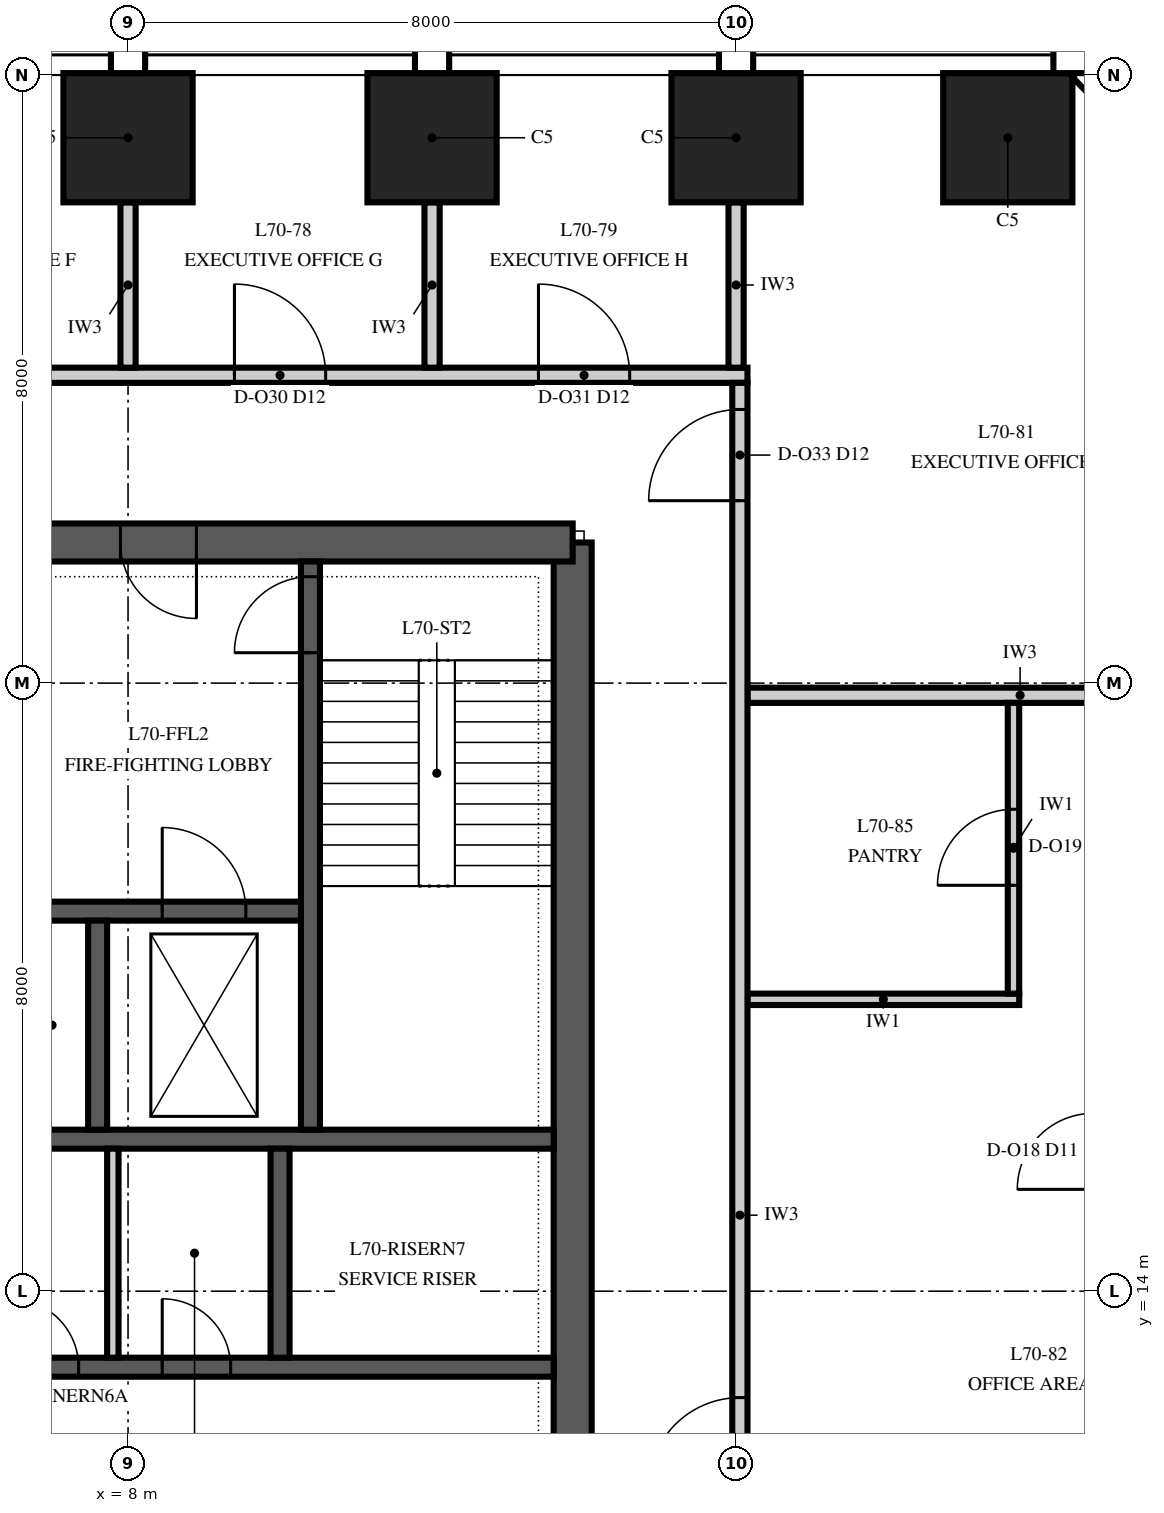
"""IFC4 building model, lengths in metres.
Left out: names, types, materials, properties, quantities, classifications, styles, units other than length and angle.
Written with IfcOpenShell. Run it as: python <this file> out.ifc"""

import sys

from ifc_helpers import new_model, si_unit, direction, frame, frame_2d, origin, origin_2d, place, context, subcontext, project, spatial, polyline, rectangle, outline, extrude, element, fill, save


model = new_model("IFC4")
c1 = context("Model", 3, precision=1e-05, world=origin(), true_north=direction((0.0, 1.0)))
c2 = subcontext(c1, "Body", "Model", "MODEL_VIEW")
j1 = project(units=[si_unit("LENGTHUNIT", "METRE"), si_unit("PLANEANGLEUNIT", "RADIAN")], contexts=[c1])
p1 = place(None, origin())
s1 = spatial("IfcSite", under=j1, at=p1, CompositionType="ELEMENT")
p2 = place(p1, origin())
s2 = spatial("IfcBuilding", under=s1, at=p2, CompositionType="ELEMENT")
p3 = place(p2, frame((0.0, 0.0, 300.0)))
s3 = spatial("IfcBuildingStorey", under=s2, at=p3, CompositionType="ELEMENT", Elevation=300.0)
for number, where, z_axis, x_axis in (
    (1, (19.575, 29.175, 0.0), (0.0, 0.0, 1.0), (-1.0, 0.0, 0.0)),
    (2, (16.0, 29.175, 0.0), (0.0, 0.0, 1.0), (-1.0, 0.0, 0.0)),
    (3, (12.0, 29.175, 0.0), (0.0, 0.0, 1.0), (-1.0, 0.0, 0.0)),
    (4, (8.0, 29.175, 0.0), (0.0, 0.0, 1.0), (-1.0, 0.0, 0.0)),
):
    element("IfcColumn", number, at=place(p3, frame(where, z_axis=z_axis, x_axis=x_axis)), inside=s3, PredefinedType="COLUMN", context=c2, shape_type="SweptSolid", body=[
        extrude(rectangle(XDim=1.7, YDim=1.7, at=origin_2d()), origin(), (0.0, 0.0, 1.0), 4.0),
    ])
p4 = place(p3, frame((13.85, 6.15, 0.0), z_axis=(0.0, 0.0, 1.0), x_axis=(0.0, 1.0, 0.0)))
e5 = element("IfcWall", 5, at=p4, inside=s3, PredefinedType="SHEAR", context=c2, shape_type="SweptSolid", body=[
    extrude(outline(polyline([(0.0, -0.25), (17.7, -0.25), (17.7, 0.0), (17.45, 0.0), (17.45, 0.25), (0.25, 0.25), (0.25, 0.0), (0.0, 0.0), (0.0, -0.25)])), origin(), (0.0, 0.0, 1.0), 4.0),
])
p5 = place(p4, frame((4.15, 0.0, 0.0)))
e6 = element("IfcOpeningElement", 6, at=p5, cuts=e5, PredefinedType="OPENING", context=c2, shape_type="SweptSolid", body=[
    extrude(rectangle(XDim=1.8, YDim=2.4, at=frame_2d((0.9, 1.2))), frame((0.0, 0.265, 0.0), z_axis=(0.0, -1.0, 0.0), x_axis=(1.0, 0.0, 0.0)), (0.0, 0.0, 1.0), 0.53),
])
p6 = place(p3, frame((13.85, 23.85, 0.0), z_axis=(0.0, 0.0, 1.0), x_axis=(-1.0, 0.0, 0.0)))
e7 = element("IfcWall", 7, at=p6, inside=s3, PredefinedType="SHEAR", context=c2, shape_type="SweptSolid", body=[
    extrude(rectangle(XDim=27.7, YDim=0.5, at=frame_2d((13.85, 0.0))), origin(), (0.0, 0.0, 1.0), 4.0),
])
p7 = place(p6, frame((21.75, 0.0, 0.0)))
e8 = element("IfcOpeningElement", 8, at=p7, cuts=e7, PredefinedType="OPENING", context=c2, shape_type="SweptSolid", body=[
    extrude(rectangle(XDim=1.0, YDim=2.1, at=frame_2d((0.5, 1.05))), frame((0.0, 0.265, 0.0), z_axis=(0.0, -1.0, 0.0), x_axis=(1.0, 0.0, 0.0)), (0.0, 0.0, 1.0), 0.53),
])
p8 = place(p6, frame((4.95, 0.0, 0.0)))
e9 = element("IfcOpeningElement", 9, at=p8, cuts=e7, PredefinedType="OPENING", context=c2, shape_type="SweptSolid", body=[
    extrude(rectangle(XDim=1.0, YDim=2.1, at=frame_2d((0.5, 1.05))), frame((0.0, 0.265, 0.0), z_axis=(0.0, -1.0, 0.0), x_axis=(1.0, 0.0, 0.0)), (0.0, 0.0, 1.0), 0.53),
])
p9 = place(p6, frame((17.35, 0.0, 0.0)))
e10 = element("IfcOpeningElement", 10, at=p9, cuts=e7, PredefinedType="OPENING", context=c2, shape_type="SweptSolid", body=[
    extrude(rectangle(XDim=1.0, YDim=2.1, at=frame_2d((0.5, 1.05))), frame((0.0, 0.265, 0.0), z_axis=(0.0, -1.0, 0.0), x_axis=(1.0, 0.0, 0.0)), (0.0, 0.0, 1.0), 0.53),
])
p10 = place(p6, frame((13.35, 0.0, 0.0)))
e11 = element("IfcOpeningElement", 11, at=p10, cuts=e7, PredefinedType="OPENING", context=c2, shape_type="SweptSolid", body=[
    extrude(rectangle(XDim=1.0, YDim=2.1, at=frame_2d((0.5, 1.05))), frame((0.0, 0.265, 0.0), z_axis=(0.0, -1.0, 0.0), x_axis=(1.0, 0.0, 0.0)), (0.0, 0.0, 1.0), 0.53),
])
p11 = place(p6, frame((9.35, 0.0, 0.0)))
e12 = element("IfcOpeningElement", 12, at=p11, cuts=e7, PredefinedType="OPENING", context=c2, shape_type="SweptSolid", body=[
    extrude(rectangle(XDim=1.0, YDim=2.1, at=frame_2d((0.5, 1.05))), frame((0.0, 0.265, 0.0), z_axis=(0.0, -1.0, 0.0), x_axis=(1.0, 0.0, 0.0)), (0.0, 0.0, 1.0), 0.53),
])
p12 = place(p3, frame((-13.6, 13.0, 0.0), z_axis=(0.0, 0.0, 1.0), x_axis=(1.0, 0.0, 0.0)))
e13 = element("IfcWall", 13, at=p12, inside=s3, PredefinedType="SHEAR", context=c2, shape_type="SweptSolid", body=[
    extrude(rectangle(XDim=27.2, YDim=0.25, at=frame_2d((13.6, 0.0))), origin(), (0.0, 0.0, 1.0), 4.0),
])
p13 = place(p12, frame((16.75, 0.0, 0.0)))
e14 = element("IfcOpeningElement", 14, at=p13, cuts=e13, PredefinedType="OPENING", context=c2, shape_type="SweptSolid", body=[
    extrude(rectangle(XDim=0.9, YDim=2.1, at=frame_2d((0.45, 1.05))), frame((0.0, 0.14, 0.0), z_axis=(0.0, -1.0, 0.0), x_axis=(1.0, 0.0, 0.0)), (0.0, 0.0, 1.0), 0.28),
])
p14 = place(p12, frame((20.05, 0.0, 0.0)))
e15 = element("IfcOpeningElement", 15, at=p14, cuts=e13, PredefinedType="OPENING", context=c2, shape_type="SweptSolid", body=[
    extrude(rectangle(XDim=0.9, YDim=2.1, at=frame_2d((0.45, 1.05))), frame((0.0, 0.14, 0.0), z_axis=(0.0, -1.0, 0.0), x_axis=(1.0, 0.0, 0.0)), (0.0, 0.0, 1.0), 0.28),
])
p15 = place(p12, frame((22.05, 0.0, 0.0)))
e16 = element("IfcOpeningElement", 16, at=p15, cuts=e13, PredefinedType="OPENING", context=c2, shape_type="SweptSolid", body=[
    extrude(rectangle(XDim=0.9, YDim=2.1, at=frame_2d((0.45, 1.05))), frame((0.0, 0.14, 0.0), z_axis=(0.0, -1.0, 0.0), x_axis=(1.0, 0.0, 0.0)), (0.0, 0.0, 1.0), 0.28),
])
p16 = place(p12, frame((0.55, 0.0, 0.0)))
e17 = element("IfcOpeningElement", 17, at=p16, cuts=e13, PredefinedType="OPENING", context=c2, shape_type="SweptSolid", body=[
    extrude(rectangle(XDim=0.9, YDim=2.1, at=frame_2d((0.45, 1.05))), frame((0.0, 0.14, 0.0), z_axis=(0.0, -1.0, 0.0), x_axis=(1.0, 0.0, 0.0)), (0.0, 0.0, 1.0), 0.28),
])
p17 = place(p12, frame((3.35, 0.0, 0.0)))
e18 = element("IfcOpeningElement", 18, at=p17, cuts=e13, PredefinedType="OPENING", context=c2, shape_type="SweptSolid", body=[
    extrude(rectangle(XDim=0.9, YDim=2.1, at=frame_2d((0.45, 1.05))), frame((0.0, 0.14, 0.0), z_axis=(0.0, -1.0, 0.0), x_axis=(1.0, 0.0, 0.0)), (0.0, 0.0, 1.0), 0.28),
])
p18 = place(p12, frame((6.15, 0.0, 0.0)))
e19 = element("IfcOpeningElement", 19, at=p18, cuts=e13, PredefinedType="OPENING", context=c2, shape_type="SweptSolid", body=[
    extrude(rectangle(XDim=0.9, YDim=2.1, at=frame_2d((0.45, 1.05))), frame((0.0, 0.14, 0.0), z_axis=(0.0, -1.0, 0.0), x_axis=(1.0, 0.0, 0.0)), (0.0, 0.0, 1.0), 0.28),
])
p19 = place(p3, frame((-13.6, 16.0, 0.0), z_axis=(0.0, 0.0, 1.0), x_axis=(1.0, 0.0, 0.0)))
e20 = element("IfcWall", 20, at=p19, inside=s3, PredefinedType="SHEAR", context=c2, shape_type="SweptSolid", body=[
    extrude(rectangle(XDim=27.2, YDim=0.25, at=frame_2d((13.6, 0.0))), origin(), (0.0, 0.0, 1.0), 4.0),
])
p20 = place(p3, frame((10.0, 13.125, 0.0), z_axis=(0.0, 0.0, 1.0), x_axis=(0.0, 1.0, 0.0)))
e21 = element("IfcWall", 21, at=p20, inside=s3, PredefinedType="SHEAR", context=c2, shape_type="SweptSolid", body=[
    extrude(rectangle(XDim=2.75, YDim=0.25, at=frame_2d((1.375, 0.0))), origin(), (0.0, 0.0, 1.0), 4.0),
])
p21 = place(p3, frame((10.4, 16.125, 0.0), z_axis=(0.0, 0.0, 1.0), x_axis=(0.0, 1.0, 0.0)))
e22 = element("IfcWall", 22, at=p21, inside=s3, PredefinedType="SHEAR", context=c2, shape_type="SweptSolid", body=[
    extrude(rectangle(XDim=7.475, YDim=0.25, at=frame_2d((3.738, 0.0))), origin(), (0.0, 0.0, 1.0), 4.0),
])
p22 = place(p21, frame((6.275, 0.0, 0.0)))
e23 = element("IfcOpeningElement", 23, at=p22, cuts=e22, PredefinedType="OPENING", context=c2, shape_type="SweptSolid", body=[
    extrude(rectangle(XDim=1.0, YDim=2.1, at=frame_2d((0.5, 1.05))), frame((0.0, 0.14, 0.0), z_axis=(0.0, -1.0, 0.0), x_axis=(1.0, 0.0, 0.0)), (0.0, 0.0, 1.0), 0.28),
])
p23 = place(p3, frame((6.525, 19.0, 0.0), z_axis=(0.0, 0.0, 1.0), x_axis=(1.0, 0.0, 0.0)))
e24 = element("IfcWall", 24, at=p23, inside=s3, PredefinedType="SHEAR", context=c2, shape_type="SweptSolid", body=[
    extrude(rectangle(XDim=3.75, YDim=0.25, at=frame_2d((1.875, 0.0))), origin(), (0.0, 0.0, 1.0), 4.0),
])
p24 = place(p23, frame((1.925, 0.0, 0.0)))
e25 = element("IfcOpeningElement", 25, at=p24, cuts=e24, PredefinedType="OPENING", context=c2, shape_type="SweptSolid", body=[
    extrude(rectangle(XDim=1.1, YDim=2.1, at=frame_2d((0.55, 1.05))), frame((0.0, 0.14, 0.0), z_axis=(0.0, -1.0, 0.0), x_axis=(1.0, 0.0, 0.0)), (0.0, 0.0, 1.0), 0.28),
])
p25 = place(p3, frame((7.6, 16.125, 0.0), z_axis=(0.0, 0.0, 1.0), x_axis=(0.0, 1.0, 0.0)))
e26 = element("IfcWall", 26, at=p25, inside=s3, PredefinedType="SHEAR", context=c2, shape_type="SweptSolid", body=[
    extrude(rectangle(XDim=2.75, YDim=0.25, at=frame_2d((1.375, 0.0))), origin(), (0.0, 0.0, 1.0), 4.0),
])
p26 = place(p3, frame((7.8, 13.125, 0.0), z_axis=(0.0, 0.0, 1.0), x_axis=(0.0, 1.0, 0.0)))
e27 = element("IfcWall", 27, at=p26, inside=s3, PredefinedType="PARTITIONING", context=c2, shape_type="SweptSolid", body=[
    extrude(rectangle(XDim=2.75, YDim=0.15, at=frame_2d((1.375, 0.0))), origin(), (0.0, 0.0, 1.0), 3.85),
])
p27 = place(p3, frame((16.15, 17.84, 0.0), z_axis=(0.0, 0.0, 1.0), x_axis=(1.0, 0.0, 0.0)))
e28 = element("IfcWall", 28, at=p27, inside=s3, PredefinedType="PARTITIONING", context=c2, shape_type="SweptSolid", body=[
    extrude(rectangle(XDim=3.575, YDim=0.15, at=frame_2d((1.788, 0.0))), origin(), (0.0, 0.0, 1.0), 3.23),
])
p28 = place(p3, frame((16.15, 21.84, 0.0), z_axis=(0.0, 0.0, 1.0), x_axis=(1.0, 0.0, 0.0)))
e29 = element("IfcWall", 29, at=p28, inside=s3, PredefinedType="PARTITIONING", context=c2, shape_type="SweptSolid", body=[
    extrude(rectangle(XDim=7.174, YDim=0.2, at=frame_2d((3.587, 0.0))), origin(), (0.0, 0.0, 1.0), 3.23),
])
p29 = place(p3, frame((-16.15, 26.05, 0.0), z_axis=(0.0, 0.0, 1.0), x_axis=(1.0, 0.0, 0.0)))
e30 = element("IfcWall", 30, at=p29, inside=s3, PredefinedType="PARTITIONING", context=c2, shape_type="SweptSolid", body=[
    extrude(rectangle(XDim=32.3, YDim=0.2, at=frame_2d((16.15, 0.0))), origin(), (0.0, 0.0, 1.0), 3.418),
])
p30 = place(p29, frame((1.55, 0.0, 0.0)))
e31 = element("IfcOpeningElement", 31, at=p30, cuts=e30, PredefinedType="OPENING", context=c2, shape_type="SweptSolid", body=[
    extrude(rectangle(XDim=1.2, YDim=2.4, at=frame_2d((0.6, 1.2))), frame((0.0, 0.115, 0.0), z_axis=(0.0, -1.0, 0.0), x_axis=(1.0, 0.0, 0.0)), (0.0, 0.0, 1.0), 0.23),
])
p31 = place(p29, frame((5.55, 0.0, 0.0)))
e32 = element("IfcOpeningElement", 32, at=p31, cuts=e30, PredefinedType="OPENING", context=c2, shape_type="SweptSolid", body=[
    extrude(rectangle(XDim=1.2, YDim=2.4, at=frame_2d((0.6, 1.2))), frame((0.0, 0.115, 0.0), z_axis=(0.0, -1.0, 0.0), x_axis=(1.0, 0.0, 0.0)), (0.0, 0.0, 1.0), 0.23),
])
p32 = place(p29, frame((9.55, 0.0, 0.0)))
e33 = element("IfcOpeningElement", 33, at=p32, cuts=e30, PredefinedType="OPENING", context=c2, shape_type="SweptSolid", body=[
    extrude(rectangle(XDim=1.2, YDim=2.4, at=frame_2d((0.6, 1.2))), frame((0.0, 0.115, 0.0), z_axis=(0.0, -1.0, 0.0), x_axis=(1.0, 0.0, 0.0)), (0.0, 0.0, 1.0), 0.23),
])
p33 = place(p29, frame((13.55, 0.0, 0.0)))
e34 = element("IfcOpeningElement", 34, at=p33, cuts=e30, PredefinedType="OPENING", context=c2, shape_type="SweptSolid", body=[
    extrude(rectangle(XDim=1.2, YDim=2.4, at=frame_2d((0.6, 1.2))), frame((0.0, 0.115, 0.0), z_axis=(0.0, -1.0, 0.0), x_axis=(1.0, 0.0, 0.0)), (0.0, 0.0, 1.0), 0.23),
])
p34 = place(p29, frame((17.55, 0.0, 0.0)))
e35 = element("IfcOpeningElement", 35, at=p34, cuts=e30, PredefinedType="OPENING", context=c2, shape_type="SweptSolid", body=[
    extrude(rectangle(XDim=1.2, YDim=2.4, at=frame_2d((0.6, 1.2))), frame((0.0, 0.115, 0.0), z_axis=(0.0, -1.0, 0.0), x_axis=(1.0, 0.0, 0.0)), (0.0, 0.0, 1.0), 0.23),
])
p35 = place(p29, frame((21.55, 0.0, 0.0)))
e36 = element("IfcOpeningElement", 36, at=p35, cuts=e30, PredefinedType="OPENING", context=c2, shape_type="SweptSolid", body=[
    extrude(rectangle(XDim=1.2, YDim=2.4, at=frame_2d((0.6, 1.2))), frame((0.0, 0.115, 0.0), z_axis=(0.0, -1.0, 0.0), x_axis=(1.0, 0.0, 0.0)), (0.0, 0.0, 1.0), 0.23),
])
p36 = place(p29, frame((25.55, 0.0, 0.0)))
e37 = element("IfcOpeningElement", 37, at=p36, cuts=e30, PredefinedType="OPENING", context=c2, shape_type="SweptSolid", body=[
    extrude(rectangle(XDim=1.2, YDim=2.4, at=frame_2d((0.6, 1.2))), frame((0.0, 0.115, 0.0), z_axis=(0.0, -1.0, 0.0), x_axis=(1.0, 0.0, 0.0)), (0.0, 0.0, 1.0), 0.23),
])
p37 = place(p29, frame((29.55, 0.0, 0.0)))
e38 = element("IfcOpeningElement", 38, at=p37, cuts=e30, PredefinedType="OPENING", context=c2, shape_type="SweptSolid", body=[
    extrude(rectangle(XDim=1.2, YDim=2.4, at=frame_2d((0.6, 1.2))), frame((0.0, 0.115, 0.0), z_axis=(0.0, -1.0, 0.0), x_axis=(1.0, 0.0, 0.0)), (0.0, 0.0, 1.0), 0.23),
])
for number, where, z_axis, x_axis in (
    (39, (8.0, 26.15, 0.0), (0.0, 0.0, 1.0), (0.0, 1.0, 0.0)),
    (40, (12.0, 26.15, 0.0), (0.0, 0.0, 1.0), (0.0, 1.0, 0.0)),
    (41, (16.0, 26.15, 0.0), (0.0, 0.0, 1.0), (0.0, 1.0, 0.0)),
):
    element("IfcWall", number, at=place(p3, frame(where, z_axis=z_axis, x_axis=x_axis)), inside=s3, PredefinedType="PARTITIONING", context=c2, shape_type="SweptSolid", body=[
        extrude(rectangle(XDim=2.175, YDim=0.2, at=frame_2d((1.087, 0.0))), origin(), (0.0, 0.0, 1.0), 3.418),
    ])
p38 = place(p3, frame((16.05, 4.05, 0.0), z_axis=(0.0, 0.0, 1.0), x_axis=(0.0, 1.0, 0.0)))
e42 = element("IfcWall", 42, at=p38, inside=s3, PredefinedType="PARTITIONING", context=c2, shape_type="SweptSolid", body=[
    extrude(rectangle(XDim=21.9, YDim=0.2, at=frame_2d((10.95, 0.0))), origin(), (0.0, 0.0, 1.0), 2.842),
])
p39 = place(p38, frame((0.25, 0.0, 0.0)))
e43 = element("IfcOpeningElement", 43, at=p39, cuts=e42, PredefinedType="OPENING", context=c2, shape_type="SweptSolid", body=[
    extrude(rectangle(XDim=1.2, YDim=2.4, at=frame_2d((0.6, 1.2))), frame((0.0, 0.115, 0.0), z_axis=(0.0, -1.0, 0.0), x_axis=(1.0, 0.0, 0.0)), (0.0, 0.0, 1.0), 0.23),
])
p40 = place(p38, frame((7.35, 0.0, 0.0)))
e44 = element("IfcOpeningElement", 44, at=p40, cuts=e42, PredefinedType="OPENING", context=c2, shape_type="SweptSolid", body=[
    extrude(rectangle(XDim=1.2, YDim=2.4, at=frame_2d((0.6, 1.2))), frame((0.0, 0.115, 0.0), z_axis=(0.0, -1.0, 0.0), x_axis=(1.0, 0.0, 0.0)), (0.0, 0.0, 1.0), 0.23),
])
p41 = place(p38, frame((20.35, 0.0, 0.0)))
e45 = element("IfcOpeningElement", 45, at=p41, cuts=e42, PredefinedType="OPENING", context=c2, shape_type="SweptSolid", body=[
    extrude(rectangle(XDim=1.2, YDim=2.4, at=frame_2d((0.6, 1.2))), frame((0.0, 0.115, 0.0), z_axis=(0.0, -1.0, 0.0), x_axis=(1.0, 0.0, 0.0)), (0.0, 0.0, 1.0), 0.23),
])
p42 = place(p3, frame((19.65, 17.915, 0.0), z_axis=(0.0, 0.0, 1.0), x_axis=(0.0, 1.0, 0.0)))
e46 = element("IfcWall", 46, at=p42, inside=s3, PredefinedType="PARTITIONING", context=c2, shape_type="SweptSolid", body=[
    extrude(rectangle(XDim=3.825, YDim=0.15, at=frame_2d((1.913, 0.0))), origin(), (0.0, 0.0, 1.0), 3.23),
])
p43 = place(p42, frame((1.425, 0.0, 0.0)))
e47 = element("IfcOpeningElement", 47, at=p43, cuts=e46, PredefinedType="OPENING", context=c2, shape_type="SweptSolid", body=[
    extrude(rectangle(XDim=1.0, YDim=2.3, at=frame_2d((0.5, 1.15))), frame((0.0, 0.09, 0.0), z_axis=(0.0, -1.0, 0.0), x_axis=(1.0, 0.0, 0.0)), (0.0, 0.0, 1.0), 0.18),
])
p44 = place(p8, origin())
e48 = element("IfcDoor", 48, at=p44, inside=s3, OperationType="SINGLE_SWING_RIGHT", PredefinedType="DOOR", context=c2, shape_type="SweptSolid", body=[
    extrude(rectangle(XDim=1.0, YDim=2.1, at=frame_2d((0.5, 1.05))), frame((0.0, 0.25, 0.0), z_axis=(0.0, -1.0, 0.0), x_axis=(1.0, 0.0, 0.0)), (0.0, 0.0, 1.0), 0.5),
])
fill(e9, e48)
p45 = place(p22, origin())
e49 = element("IfcDoor", 49, at=p45, inside=s3, OperationType="SINGLE_SWING_LEFT", PredefinedType="DOOR", context=c2, shape_type="SweptSolid", body=[
    extrude(rectangle(XDim=1.0, YDim=2.1, at=frame_2d((0.5, 1.05))), frame((0.0, 0.125, 0.0), z_axis=(0.0, -1.0, 0.0), x_axis=(1.0, 0.0, 0.0)), (0.0, 0.0, 1.0), 0.25),
])
fill(e23, e49)
p46 = place(p24, origin())
e50 = element("IfcDoor", 50, at=p46, inside=s3, OperationType="SLIDING_TO_RIGHT", PredefinedType="DOOR", context=c2, shape_type="SweptSolid", body=[
    extrude(rectangle(XDim=1.1, YDim=2.1, at=frame_2d((0.55, 1.05))), frame((0.0, 0.125, 0.0), z_axis=(0.0, -1.0, 0.0), x_axis=(1.0, 0.0, 0.0)), (0.0, 0.0, 1.0), 0.25),
])
fill(e25, e50)
p47 = place(p14, origin())
e51 = element("IfcDoor", 51, at=p47, inside=s3, OperationType="SINGLE_SWING_LEFT", PredefinedType="DOOR", context=c2, shape_type="SweptSolid", body=[
    extrude(rectangle(XDim=0.9, YDim=2.1, at=frame_2d((0.45, 1.05))), frame((0.0, 0.125, 0.0), z_axis=(0.0, -1.0, 0.0), x_axis=(1.0, 0.0, 0.0)), (0.0, 0.0, 1.0), 0.25),
])
fill(e15, e51)
p48 = place(p15, origin())
e52 = element("IfcDoor", 52, at=p48, inside=s3, OperationType="SINGLE_SWING_LEFT", PredefinedType="DOOR", context=c2, shape_type="SweptSolid", body=[
    extrude(rectangle(XDim=0.9, YDim=2.1, at=frame_2d((0.45, 1.05))), frame((0.0, 0.125, 0.0), z_axis=(0.0, -1.0, 0.0), x_axis=(1.0, 0.0, 0.0)), (0.0, 0.0, 1.0), 0.25),
])
fill(e16, e52)
p49 = place(p43, origin())
e53 = element("IfcDoor", 53, at=p49, inside=s3, OperationType="SINGLE_SWING_LEFT", PredefinedType="DOOR", context=c2, shape_type="SweptSolid", body=[
    extrude(rectangle(XDim=1.0, YDim=2.3, at=frame_2d((0.5, 1.15))), frame((0.0, 0.075, 0.0), z_axis=(0.0, -1.0, 0.0), x_axis=(1.0, 0.0, 0.0)), (0.0, 0.0, 1.0), 0.149),
])
fill(e47, e53)
p50 = place(p40, origin())
e54 = element("IfcDoor", 54, at=p50, inside=s3, OperationType="SINGLE_SWING_LEFT", PredefinedType="DOOR", context=c2, shape_type="SweptSolid", body=[
    extrude(rectangle(XDim=1.2, YDim=2.4, at=frame_2d((0.6, 1.2))), frame((0.0, 0.1, 0.0), z_axis=(0.0, -1.0, 0.0), x_axis=(1.0, 0.0, 0.0)), (0.0, 0.0, 1.0), 0.199),
])
fill(e44, e54)
p51 = place(p36, origin())
e55 = element("IfcDoor", 55, at=p51, inside=s3, OperationType="SINGLE_SWING_LEFT", PredefinedType="DOOR", context=c2, shape_type="SweptSolid", body=[
    extrude(rectangle(XDim=1.2, YDim=2.4, at=frame_2d((0.6, 1.2))), frame((0.0, 0.1, 0.0), z_axis=(0.0, -1.0, 0.0), x_axis=(1.0, 0.0, 0.0)), (0.0, 0.0, 1.0), 0.199),
])
fill(e37, e55)
p52 = place(p37, origin())
e56 = element("IfcDoor", 56, at=p52, inside=s3, OperationType="SINGLE_SWING_LEFT", PredefinedType="DOOR", context=c2, shape_type="SweptSolid", body=[
    extrude(rectangle(XDim=1.2, YDim=2.4, at=frame_2d((0.6, 1.2))), frame((0.0, 0.1, 0.0), z_axis=(0.0, -1.0, 0.0), x_axis=(1.0, 0.0, 0.0)), (0.0, 0.0, 1.0), 0.199),
])
fill(e38, e56)
p53 = place(p41, origin())
e57 = element("IfcDoor", 57, at=p53, inside=s3, OperationType="SINGLE_SWING_LEFT", PredefinedType="DOOR", context=c2, shape_type="SweptSolid", body=[
    extrude(rectangle(XDim=1.2, YDim=2.4, at=frame_2d((0.6, 1.2))), frame((0.0, 0.1, 0.0), z_axis=(0.0, -1.0, 0.0), x_axis=(1.0, 0.0, 0.0)), (0.0, 0.0, 1.0), 0.199),
])
fill(e45, e57)
save(model, sys.argv[1])
